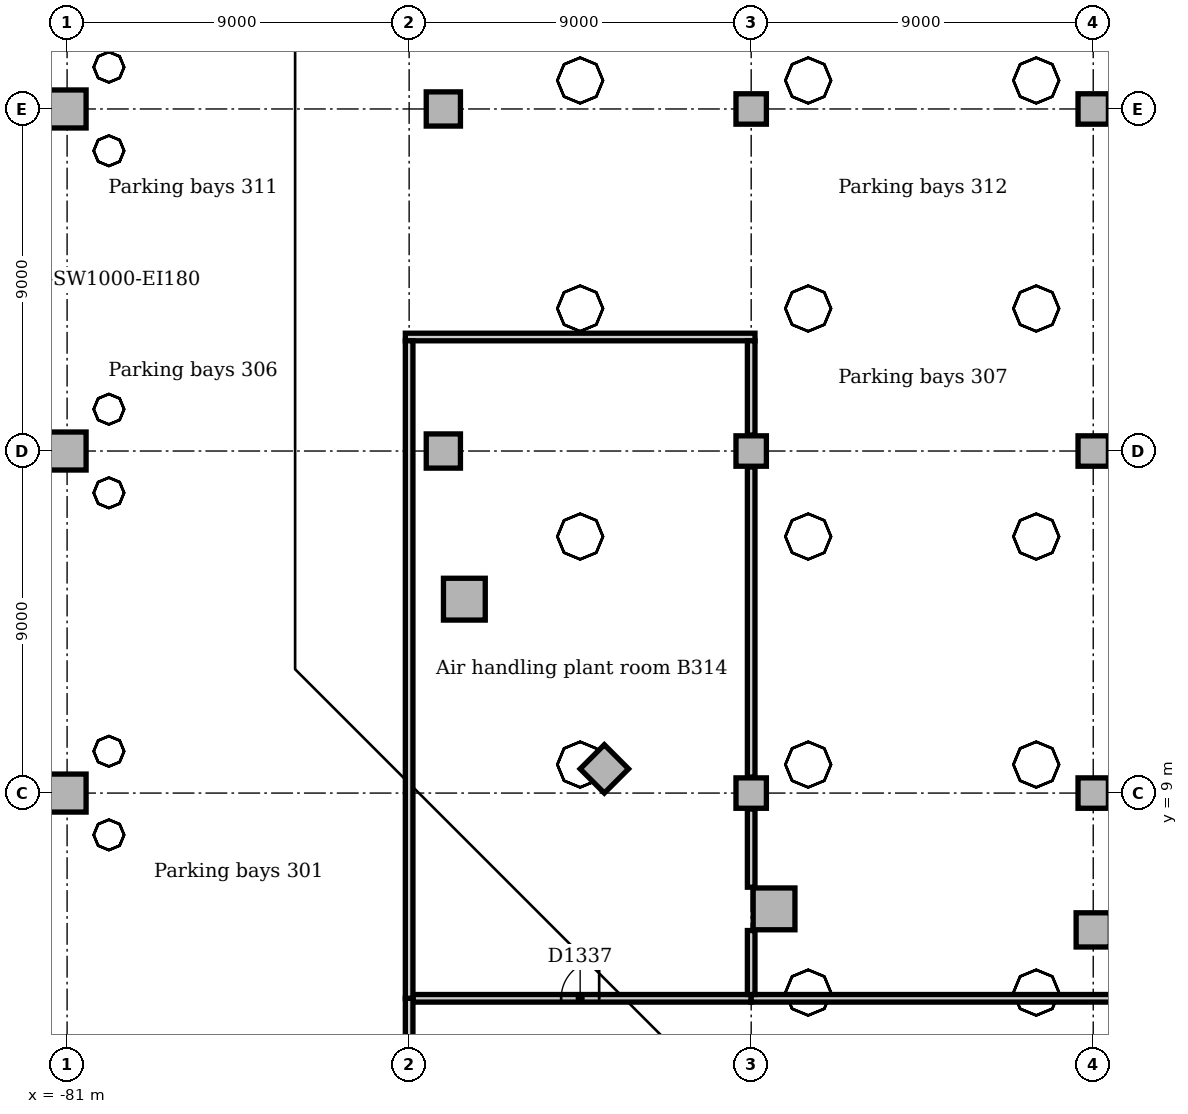
"""IFC4 building model, lengths in metres.
Left out: names, types, materials, properties, quantities, classifications, styles, units other than length and angle.
Written with IfcOpenShell. Run it as: python <this file> out.ifc"""

import sys

from ifc_helpers import new_model, si_unit, direction, frame, frame_2d, origin, origin_2d, place, context, subcontext, project, spatial, rectangle, extrude, element, fill, save


model = new_model("IFC4")
c1 = context("Model", 3, precision=1e-05, world=origin(), true_north=direction((0.0, 1.0)))
c2 = subcontext(c1, "Body", "Model", "MODEL_VIEW")
j1 = project(units=[si_unit("LENGTHUNIT", "METRE"), si_unit("PLANEANGLEUNIT", "RADIAN")], contexts=[c1])
p1 = place(None, origin())
s1 = spatial("IfcSite", under=j1, at=p1, CompositionType="ELEMENT")
p2 = place(p1, origin())
s2 = spatial("IfcBuilding", under=s1, at=p2, CompositionType="ELEMENT")
p3 = place(p2, frame((0.0, 0.0, -14.0)))
s3 = spatial("IfcBuildingStorey", under=s2, at=p3, CompositionType="ELEMENT", Elevation=-14.0)
for number, where, z_axis, x_axis in (
    (1, (-62.398, 5.953, 0.0), (0.0, 0.0, 1.0), (1.0, 0.0, 0.0)),
    (2, (-70.547, 14.102, 0.0), (0.0, 0.0, 1.0), (1.0, 0.0, 0.0)),
):
    element("IfcColumn", number, at=place(p3, frame(where, z_axis=z_axis, x_axis=x_axis)), inside=s3, PredefinedType="COLUMN", context=c2, shape_type="SweptSolid", body=[
        extrude(rectangle(XDim=1.1, YDim=1.1, at=origin_2d()), origin(), (0.0, 0.0, 1.0), 4.15),
    ])
for number, where, z_axis, x_axis in (
    (3, (-54.0, 5.4, 0.0), (0.0, 0.0, 1.0), (1.0, 0.0, 0.0)),
    (4, (-71.1, 18.0, 0.0), (0.0, 0.0, 1.0), (1.0, 0.0, 0.0)),
    (5, (-71.1, 27.0, 0.0), (0.0, 0.0, 1.0), (1.0, 0.0, 0.0)),
    (6, (-66.864, 9.636, 0.0), (0.0, 0.0, 1.0), (0.707, 0.707, 0.0)),
):
    element("IfcColumn", number, at=place(p3, frame(where, z_axis=z_axis, x_axis=x_axis)), inside=s3, PredefinedType="COLUMN", context=c2, shape_type="SweptSolid", body=[
        extrude(rectangle(XDim=0.9, YDim=0.9, at=origin_2d()), origin(), (0.0, 0.0, 1.0), 4.15),
    ])
for number, where, z_axis, x_axis in (
    (7, (-63.0, 9.0, 0.0), (0.0, 0.0, 1.0), (1.0, 0.0, 0.0)),
    (8, (-63.0, 18.0, 0.0), (0.0, 0.0, 1.0), (1.0, 0.0, 0.0)),
    (9, (-63.0, 27.0, 0.0), (0.0, 0.0, 1.0), (1.0, 0.0, 0.0)),
    (10, (-54.0, 9.0, 0.0), (0.0, 0.0, 1.0), (1.0, 0.0, 0.0)),
    (11, (-54.0, 18.0, 0.0), (0.0, 0.0, 1.0), (1.0, 0.0, 0.0)),
    (12, (-54.0, 27.0, 0.0), (0.0, 0.0, 1.0), (1.0, 0.0, 0.0)),
):
    element("IfcColumn", number, at=place(p3, frame(where, z_axis=z_axis, x_axis=x_axis)), inside=s3, PredefinedType="COLUMN", context=c2, shape_type="SweptSolid", body=[
        extrude(rectangle(XDim=0.8, YDim=0.8, at=origin_2d()), origin(), (0.0, 0.0, 1.0), 4.15),
    ])
for number, where, z_axis, x_axis in (
    (13, (-81.0, 9.0, 0.0), (0.0, 0.0, 1.0), (1.0, 0.0, 0.0)),
    (14, (-81.0, 18.0, 0.0), (0.0, 0.0, 1.0), (1.0, 0.0, 0.0)),
    (15, (-81.0, 27.0, 0.0), (0.0, 0.0, 1.0), (1.0, 0.0, 0.0)),
):
    element("IfcColumn", number, at=place(p3, frame(where, z_axis=z_axis, x_axis=x_axis)), inside=s3, PredefinedType="COLUMN", context=c2, shape_type="SweptSolid", body=[
        extrude(rectangle(XDim=1.0, YDim=1.0, at=origin_2d()), origin(), (0.0, 0.0, 1.0), 4.15),
    ])
p4 = place(p3, frame((-71.9, 3.6, 0.0), z_axis=(0.0, 0.0, 1.0), x_axis=(1.0, 0.0, 0.0)))
e16 = element("IfcWall", 16, at=p4, inside=s3, PredefinedType="PARTITIONING", context=c2, shape_type="SweptSolid", body=[
    extrude(rectangle(XDim=8.9, YDim=0.2, at=frame_2d((4.45, 0.0))), origin(), (0.0, 0.0, 1.0), 4.15),
])
p5 = place(p4, frame((3.9, 0.0, 0.0)))
e17 = element("IfcOpeningElement", 17, at=p5, cuts=e16, PredefinedType="OPENING", context=c2, shape_type="SweptSolid", body=[
    extrude(rectangle(XDim=1.0, YDim=2.1, at=frame_2d((0.5, 1.05))), frame((0.0, 0.11, 0.0), z_axis=(0.0, -1.0, 0.0), x_axis=(1.0, 0.0, 0.0)), (0.0, 0.0, 1.0), 0.22),
])
p6 = place(p3, frame((-63.0, 3.6, 0.0), z_axis=(0.0, 0.0, 1.0), x_axis=(1.0, 0.0, 0.0)))
e18 = element("IfcWall", 18, at=p6, inside=s3, PredefinedType="PARTITIONING", context=c2, shape_type="SweptSolid", body=[
    extrude(rectangle(XDim=36.1, YDim=0.2, at=frame_2d((18.05, 0.0))), origin(), (0.0, 0.0, 1.0), 4.15),
])
p7 = place(p6, frame((13.5, 0.0, 0.0)))
e19 = element("IfcOpeningElement", 19, at=p7, cuts=e18, PredefinedType="OPENING", context=c2, shape_type="SweptSolid", body=[
    extrude(rectangle(XDim=1.8, YDim=2.1, at=frame_2d((0.9, 1.05))), frame((0.0, 0.11, 0.0), z_axis=(0.0, -1.0, 0.0), x_axis=(1.0, 0.0, 0.0)), (0.0, 0.0, 1.0), 0.22),
])
p8 = place(p6, frame((27.9, 0.0, 0.0)))
e20 = element("IfcOpeningElement", 20, at=p8, cuts=e18, PredefinedType="OPENING", context=c2, shape_type="SweptSolid", body=[
    extrude(rectangle(XDim=1.8, YDim=2.1, at=frame_2d((0.9, 1.05))), frame((0.0, 0.11, 0.0), z_axis=(0.0, -1.0, 0.0), x_axis=(1.0, 0.0, 0.0)), (0.0, 0.0, 1.0), 0.22),
])
p9 = place(p3, frame((-72.0, 0.52, 0.0), z_axis=(0.0, 0.0, 1.0), x_axis=(0.0, 1.0, 0.0)))
e21 = element("IfcWall", 21, at=p9, inside=s3, PredefinedType="PARTITIONING", context=c2, shape_type="SweptSolid", body=[
    extrude(rectangle(XDim=3.08, YDim=0.2, at=frame_2d((1.54, 0.0))), origin(), (0.0, 0.0, 1.0), 4.15),
])
p10 = place(p3, frame((-72.1, 21.0, 0.0), z_axis=(0.0, 0.0, 1.0), x_axis=(1.0, 0.0, 0.0)))
e22 = element("IfcWall", 22, at=p10, inside=s3, PredefinedType="PARTITIONING", context=c2, shape_type="SweptSolid", body=[
    extrude(rectangle(XDim=9.2, YDim=0.2, at=frame_2d((4.6, 0.0))), origin(), (0.0, 0.0, 1.0), 4.15),
])
p11 = place(p3, frame((-63.0, 3.7, 0.0), z_axis=(0.0, 0.0, 1.0), x_axis=(0.0, 1.0, 0.0)))
e23 = element("IfcWall", 23, at=p11, inside=s3, PredefinedType="PARTITIONING", context=c2, shape_type="SweptSolid", body=[
    extrude(rectangle(XDim=1.683, YDim=0.2, at=frame_2d((0.842, 0.0))), origin(), (0.0, 0.0, 1.0), 4.15),
])
p12 = place(p3, frame((-63.0, 6.523, 0.0), z_axis=(0.0, 0.0, 1.0), x_axis=(0.0, 1.0, 0.0)))
e24 = element("IfcWall", 24, at=p12, inside=s3, PredefinedType="PARTITIONING", context=c2, shape_type="SweptSolid", body=[
    extrude(rectangle(XDim=2.057, YDim=0.2, at=frame_2d((1.028, 0.0))), origin(), (0.0, 0.0, 1.0), 4.15),
])
p13 = place(p3, frame((-63.0, 9.42, 0.0), z_axis=(0.0, 0.0, 1.0), x_axis=(0.0, 1.0, 0.0)))
e25 = element("IfcWall", 25, at=p13, inside=s3, PredefinedType="PARTITIONING", context=c2, shape_type="SweptSolid", body=[
    extrude(rectangle(XDim=8.16, YDim=0.2, at=frame_2d((4.08, 0.0))), origin(), (0.0, 0.0, 1.0), 4.15),
])
p14 = place(p3, frame((-63.0, 18.42, 0.0), z_axis=(0.0, 0.0, 1.0), x_axis=(0.0, 1.0, 0.0)))
e26 = element("IfcWall", 26, at=p14, inside=s3, PredefinedType="PARTITIONING", context=c2, shape_type="SweptSolid", body=[
    extrude(rectangle(XDim=2.48, YDim=0.2, at=frame_2d((1.24, 0.0))), origin(), (0.0, 0.0, 1.0), 4.15),
])
p15 = place(p3, frame((-72.0, 3.6, 0.0), z_axis=(0.0, 0.0, 1.0), x_axis=(0.0, 1.0, 0.0)))
e27 = element("IfcWall", 27, at=p15, inside=s3, PredefinedType="PARTITIONING", context=c2, shape_type="SweptSolid", body=[
    extrude(rectangle(XDim=17.3, YDim=0.2, at=frame_2d((8.65, 0.0))), origin(), (0.0, 0.0, 1.0), 4.15),
])
p16 = place(p5, origin())
e28 = element("IfcDoor", 28, at=p16, inside=s3, OperationType="SINGLE_SWING_RIGHT", PredefinedType="DOOR", context=c2, shape_type="SweptSolid", body=[
    extrude(rectangle(XDim=1.0, YDim=2.1, at=frame_2d((0.5, 1.05))), frame((0.0, 0.025, 0.0), z_axis=(0.0, -1.0, 0.0), x_axis=(1.0, 0.0, 0.0)), (0.0, 0.0, 1.0), 0.05),
])
fill(e17, e28)
save(model, sys.argv[1])
